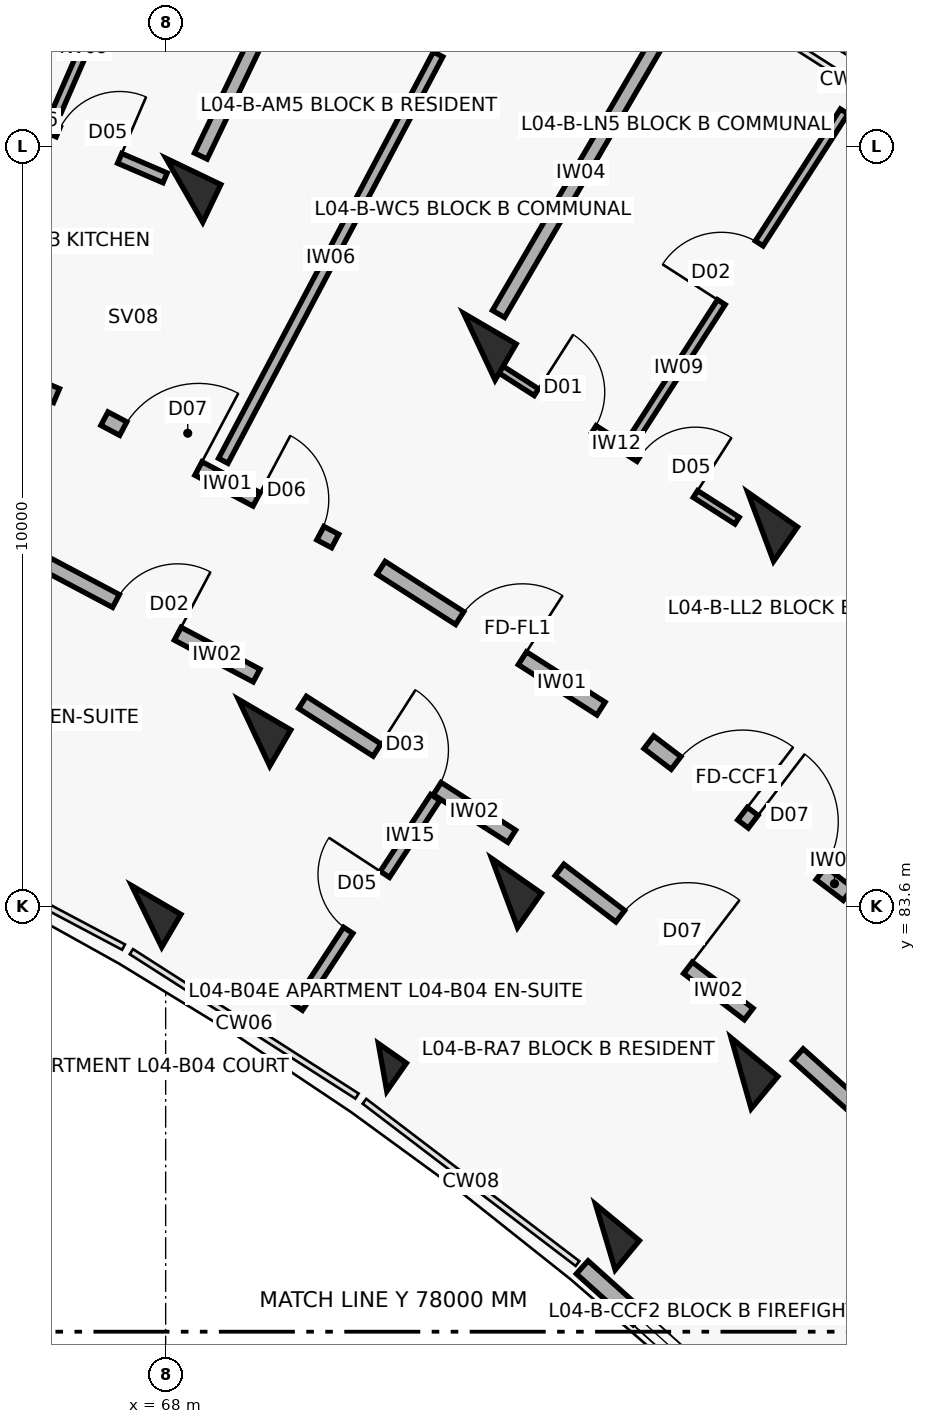
"""IFC4 building model, lengths in metres.
Left out: names, types, materials, properties, quantities, classifications, styles, units other than length and angle.
Written with IfcOpenShell. Run it as: python <this file> out.ifc"""

import sys

from ifc_helpers import new_model, si_unit, direction, frame, frame_2d, origin, origin_2d, place, context, subcontext, project, spatial, rectangle, extrude, element, fill, save


model = new_model("IFC4")
c1 = context("Model", 3, precision=1e-05, world=origin(), true_north=direction((0.0, 1.0)))
c2 = subcontext(c1, "Body", "Model", "MODEL_VIEW")
j1 = project(units=[si_unit("LENGTHUNIT", "METRE"), si_unit("PLANEANGLEUNIT", "RADIAN")], contexts=[c1])
p1 = place(None, origin())
s1 = spatial("IfcSite", under=j1, at=p1, CompositionType="ELEMENT")
p2 = place(p1, origin())
s2 = spatial("IfcBuilding", under=s1, at=p2, CompositionType="ELEMENT")
p3 = place(p2, frame((0.0, 0.0, 14.3)))
s3 = spatial("IfcBuildingStorey", under=s2, at=p3, CompositionType="ELEMENT", Elevation=14.3)
p4 = place(p3, frame((68.246, 93.019, 0.0), z_axis=(0.0, 0.0, 1.0), x_axis=(0.432085748802, 0.901832526405, 0.0)))
e1 = element("IfcColumn", 1, at=p4, inside=s3, PredefinedType="COLUMN", context=c2, shape_type="SweptSolid", body=[
    extrude(rectangle(XDim=0.55, YDim=0.8, at=origin_2d()), origin(), (0.0, 0.0, 1.0), 3.1),
])
p5 = place(p3, frame((67.751, 83.464, 0.0), z_axis=(0.0, 0.0, 1.0), x_axis=(0.504226211181, 0.863571611366, 0.0)))
e2 = element("IfcColumn", 2, at=p5, inside=s3, PredefinedType="COLUMN", context=c2, shape_type="SweptSolid", body=[
    extrude(rectangle(XDim=0.5, YDim=0.75, at=origin_2d()), origin(), (0.0, 0.0, 1.0), 3.1),
])
for number, where, z_axis, x_axis in (
    (3, (69.163, 85.882, 0.0), (0.0, 0.0, 1.0), (0.504, 0.864, 0.0)),
    (4, (72.127, 90.96, 0.0), (0.0, 0.0, 1.0), (0.504, 0.864, 0.0)),
):
    element("IfcColumn", number, at=place(p3, frame(where, z_axis=z_axis, x_axis=x_axis)), inside=s3, PredefinedType="COLUMN", context=c2, shape_type="SweptSolid", body=[
        extrude(rectangle(XDim=0.55, YDim=0.8, at=origin_2d()), origin(), (0.0, 0.0, 1.0), 3.1),
    ])
p6 = place(p3, frame((70.854, 81.478, 0.0), z_axis=(0.0, 0.0, 1.0), x_axis=(0.573004420611, 0.819552276527, 0.0)))
e5 = element("IfcColumn", 5, at=p6, inside=s3, PredefinedType="COLUMN", context=c2, shape_type="SweptSolid", body=[
    extrude(rectangle(XDim=0.45, YDim=0.45, at=origin_2d()), origin(), (0.0, 0.0, 1.0), 3.1),
])
for number, where, z_axis, x_axis in (
    (6, (72.458, 83.773, 0.0), (0.0, 0.0, 1.0), (0.573, 0.82, 0.0)),
    (7, (75.828, 88.592, 0.0), (0.0, 0.0, 1.0), (0.573, 0.82, 0.0)),
):
    element("IfcColumn", number, at=place(p3, frame(where, z_axis=z_axis, x_axis=x_axis)), inside=s3, PredefinedType="COLUMN", context=c2, shape_type="SweptSolid", body=[
        extrude(rectangle(XDim=0.55, YDim=0.8, at=origin_2d()), origin(), (0.0, 0.0, 1.0), 3.1),
    ])
p7 = place(p3, frame((73.785, 79.245, 0.0), z_axis=(0.0, 0.0, 1.0), x_axis=(0.637961754089, 0.770068049148, 0.0)))
e8 = element("IfcColumn", 8, at=p7, inside=s3, PredefinedType="COLUMN", context=c2, shape_type="SweptSolid", body=[
    extrude(rectangle(XDim=0.5, YDim=0.75, at=origin_2d()), origin(), (0.0, 0.0, 1.0), 3.1),
])
p8 = place(p3, frame((75.571, 81.402, 0.0), z_axis=(0.0, 0.0, 1.0), x_axis=(0.637961754089, 0.770068049148, 0.0)))
e9 = element("IfcColumn", 9, at=p8, inside=s3, PredefinedType="COLUMN", context=c2, shape_type="SweptSolid", body=[
    extrude(rectangle(XDim=0.55, YDim=0.8, at=origin_2d()), origin(), (0.0, 0.0, 1.0), 3.1),
])
p9 = place(p3, frame((73.481, 78.847, 0.0), z_axis=(0.0, 0.0, 1.0), x_axis=(0.743385092197, -0.668863666751, 0.0)))
e10 = element("IfcWall", 10, at=p9, inside=s3, PredefinedType="SOLIDWALL", context=c2, shape_type="SweptSolid", body=[
    extrude(rectangle(XDim=3.604, YDim=0.23, at=frame_2d((1.802, 0.0))), origin(), (0.0, 0.0, 1.0), 2.25),
])
p10 = place(p9, frame((1.002, 0.0, 0.32)))
e11 = element("IfcOpeningElement", 11, at=p10, cuts=e10, PredefinedType="OPENING", context=c2, shape_type="SweptSolid", body=[
    extrude(rectangle(XDim=1.6, YDim=1.5, at=frame_2d((0.8, 0.75))), frame((0.0, 0.125, 0.0), z_axis=(0.0, -1.0, 0.0), x_axis=(1.0, 0.0, 0.0)), (0.0, 0.0, 1.0), 0.25),
])
p11 = place(p3, frame((63.407, 91.673, 0.0), z_axis=(0.0, 0.0, 1.0), x_axis=(0.918718172399, -0.394913813008, 0.0)))
e12 = element("IfcWall", 12, at=p11, inside=s3, PredefinedType="SOLIDWALL", context=c2, shape_type="SweptSolid", body=[
    extrude(rectangle(XDim=3.436, YDim=0.2, at=frame_2d((1.718, 0.0))), origin(), (0.0, 0.0, 1.0), 2.08),
])
p12 = place(p11, frame((1.228, 0.0, 0.0)))
e13 = element("IfcOpeningElement", 13, at=p12, cuts=e12, PredefinedType="OPENING", context=c2, shape_type="SweptSolid", body=[
    extrude(rectangle(XDim=0.98, YDim=2.15, at=frame_2d((0.49, 1.075))), frame((0.0, 0.11, 0.0), z_axis=(0.0, -1.0, 0.0), x_axis=(1.0, 0.0, 0.0)), (0.0, 0.0, 1.0), 0.22),
])
p13 = place(p3, frame((64.503, 94.682, 0.0), z_axis=(0.0, 0.0, 1.0), x_axis=(0.918732171064, -0.394881245253, 0.0)))
e14 = element("IfcWall", 14, at=p13, inside=s3, PredefinedType="PARTITIONING", context=c2, shape_type="SweptSolid", body=[
    extrude(rectangle(XDim=3.797, YDim=0.14, at=frame_2d((1.899, 0.0))), origin(), (0.0, 0.0, 1.0), 2.08),
])
p14 = place(p13, frame((0.65, 0.0, 0.0)))
e15 = element("IfcOpeningElement", 15, at=p14, cuts=e14, PredefinedType="OPENING", context=c2, shape_type="SweptSolid", body=[
    extrude(rectangle(XDim=0.9, YDim=2.1, at=frame_2d((0.45, 1.05))), frame((0.0, 0.08, 0.0), z_axis=(0.0, -1.0, 0.0), x_axis=(1.0, 0.0, 0.0)), (0.0, 0.0, 1.0), 0.16),
])
p15 = place(p13, frame((2.267, 0.0, 0.0)))
e16 = element("IfcOpeningElement", 16, at=p15, cuts=e14, PredefinedType="OPENING", context=c2, shape_type="SweptSolid", body=[
    extrude(rectangle(XDim=0.88, YDim=2.1, at=frame_2d((0.44, 1.05))), frame((0.0, 0.08, 0.0), z_axis=(0.0, -1.0, 0.0), x_axis=(1.0, 0.0, 0.0)), (0.0, 0.0, 1.0), 0.16),
])
p16 = place(p3, frame((66.569, 94.06, 0.0), z_axis=(0.0, 0.0, 1.0), x_axis=(0.399048563147, 0.916929792433, 0.0)))
e17 = element("IfcWall", 17, at=p16, inside=s3, PredefinedType="PARTITIONING", context=c2, shape_type="SweptSolid", body=[
    extrude(rectangle(XDim=4.9, YDim=0.12, at=frame_2d((2.45, 0.0))), origin(), (0.0, 0.0, 1.0), 2.08),
])
p17 = place(p16, frame((1.8, 0.0, 0.0)))
e18 = element("IfcOpeningElement", 18, at=p17, cuts=e17, PredefinedType="OPENING", context=c2, shape_type="SweptSolid", body=[
    extrude(rectangle(XDim=1.3, YDim=2.1, at=frame_2d((0.65, 1.05))), frame((0.0, 0.07, 0.0), z_axis=(0.0, -1.0, 0.0), x_axis=(1.0, 0.0, 0.0)), (0.0, 0.0, 1.0), 0.14),
])
p18 = place(p3, frame((67.194, 90.014, 0.0), z_axis=(0.0, 0.0, 1.0), x_axis=(0.883410853063, -0.468599258099, 0.0)))
e19 = element("IfcWall", 19, at=p18, inside=s3, PredefinedType="SOLIDWALL", context=c2, shape_type="SweptSolid", body=[
    extrude(rectangle(XDim=3.436, YDim=0.2, at=frame_2d((1.718, 0.0))), origin(), (0.0, 0.0, 1.0), 2.08),
])
p19 = place(p18, frame((0.28, 0.0, 0.0)))
e20 = element("IfcOpeningElement", 20, at=p19, cuts=e19, PredefinedType="OPENING", context=c2, shape_type="SweptSolid", body=[
    extrude(rectangle(XDim=1.12, YDim=2.15, at=frame_2d((0.56, 1.075))), frame((0.0, 0.11, 0.0), z_axis=(0.0, -1.0, 0.0), x_axis=(1.0, 0.0, 0.0)), (0.0, 0.0, 1.0), 0.22),
])
p20 = place(p18, frame((2.266, 0.0, 0.0)))
e21 = element("IfcOpeningElement", 21, at=p20, cuts=e19, PredefinedType="OPENING", context=c2, shape_type="SweptSolid", body=[
    extrude(rectangle(XDim=0.95, YDim=2.1, at=frame_2d((0.475, 1.05))), frame((0.0, 0.11, 0.0), z_axis=(0.0, -1.0, 0.0), x_axis=(1.0, 0.0, 0.0)), (0.0, 0.0, 1.0), 0.22),
])
p21 = place(p3, frame((66.309, 88.165, 0.0), z_axis=(0.0, 0.0, 1.0), x_axis=(0.883444301944, -0.468536194293, 0.0)))
e22 = element("IfcWall", 22, at=p21, inside=s3, PredefinedType="SOLIDWALL", context=c2, shape_type="SweptSolid", body=[
    extrude(rectangle(XDim=3.269, YDim=0.19, at=frame_2d((1.634, 0.0))), origin(), (0.0, 0.0, 1.0), 2.08),
])
p22 = place(p21, frame((1.174, 0.0, 0.0)))
e23 = element("IfcOpeningElement", 23, at=p22, cuts=e22, PredefinedType="OPENING", context=c2, shape_type="SweptSolid", body=[
    extrude(rectangle(XDim=0.92, YDim=2.1, at=frame_2d((0.46, 1.05))), frame((0.0, 0.105, 0.0), z_axis=(0.0, -1.0, 0.0), x_axis=(1.0, 0.0, 0.0)), (0.0, 0.0, 1.0), 0.21),
])
p23 = place(p3, frame((68.758, 89.459, 0.0), z_axis=(0.0, 0.0, 1.0), x_axis=(0.467208910392, 0.884146952746, 0.0)))
e24 = element("IfcWall", 24, at=p23, inside=s3, PredefinedType="PARTITIONING", context=c2, shape_type="SweptSolid", body=[
    extrude(rectangle(XDim=7.95, YDim=0.14, at=frame_2d((3.975, 0.0))), origin(), (0.0, 0.0, 1.0), 2.08),
])
p24 = place(p23, frame((6.05, 0.0, 0.0)))
e25 = element("IfcOpeningElement", 25, at=p24, cuts=e24, PredefinedType="OPENING", context=c2, shape_type="SweptSolid", body=[
    extrude(rectangle(XDim=0.92, YDim=2.1, at=frame_2d((0.46, 1.05))), frame((0.0, 0.08, 0.0), z_axis=(0.0, -1.0, 0.0), x_axis=(1.0, 0.0, 0.0)), (0.0, 0.0, 1.0), 0.16),
])
p25 = place(p3, frame((68.462, 93.469, 0.0), z_axis=(0.0, 0.0, 1.0), x_axis=(0.432086898897, 0.901831975371, 0.0)))
e26 = element("IfcWall", 26, at=p25, inside=s3, PredefinedType="SOLIDWALL", context=c2, shape_type="SweptSolid", body=[
    extrude(rectangle(XDim=4.35, YDim=0.185, at=frame_2d((2.175, 0.0))), origin(), (0.0, 0.0, 1.0), 2.08),
])
p26 = place(p3, frame((70.834, 88.051, 0.0), z_axis=(0.0, 0.0, 1.0), x_axis=(0.842257205985, -0.539075874963, 0.0)))
e27 = element("IfcWall", 27, at=p26, inside=s3, PredefinedType="SOLIDWALL", context=c2, shape_type="SweptSolid", body=[
    extrude(rectangle(XDim=3.436, YDim=0.2, at=frame_2d((1.718, 0.0))), origin(), (0.0, 0.0, 1.0), 2.08),
])
p27 = place(p26, frame((1.228, 0.0, 0.0)))
e28 = element("IfcOpeningElement", 28, at=p27, cuts=e27, PredefinedType="OPENING", context=c2, shape_type="SweptSolid", body=[
    extrude(rectangle(XDim=0.98, YDim=2.15, at=frame_2d((0.49, 1.075))), frame((0.0, 0.11, 0.0), z_axis=(0.0, -1.0, 0.0), x_axis=(1.0, 0.0, 0.0)), (0.0, 0.0, 1.0), 0.22),
])
p28 = place(p3, frame((69.8, 86.281, 0.0), z_axis=(0.0, 0.0, 1.0), x_axis=(0.842225276846, -0.539125758095, 0.0)))
e29 = element("IfcWall", 29, at=p28, inside=s3, PredefinedType="SOLIDWALL", context=c2, shape_type="SweptSolid", body=[
    extrude(rectangle(XDim=3.269, YDim=0.19, at=frame_2d((1.634, 0.0))), origin(), (0.0, 0.0, 1.0), 2.08),
])
p29 = place(p28, frame((1.164, 0.0, 0.0)))
e30 = element("IfcOpeningElement", 30, at=p29, cuts=e29, PredefinedType="OPENING", context=c2, shape_type="SweptSolid", body=[
    extrude(rectangle(XDim=0.94, YDim=2.1, at=frame_2d((0.47, 1.05))), frame((0.0, 0.105, 0.0), z_axis=(0.0, -1.0, 0.0), x_axis=(1.0, 0.0, 0.0)), (0.0, 0.0, 1.0), 0.21),
])
p30 = place(p3, frame((69.739, 82.269, 0.0), z_axis=(0.0, 0.0, 1.0), x_axis=(0.547920940513, 0.836530120765, 0.0)))
e31 = element("IfcWall", 31, at=p30, inside=s3, PredefinedType="PARTITIONING", context=c2, shape_type="SweptSolid", body=[
    extrude(rectangle(XDim=3.3, YDim=0.145, at=frame_2d((1.65, 0.0))), origin(), (0.0, 0.0, 1.0), 2.08),
])
p31 = place(p30, frame((1.21, 0.0, 0.0)))
e32 = element("IfcOpeningElement", 32, at=p31, cuts=e31, PredefinedType="OPENING", context=c2, shape_type="SweptSolid", body=[
    extrude(rectangle(XDim=0.88, YDim=2.1, at=frame_2d((0.44, 1.05))), frame((0.0, 0.083, 0.0), z_axis=(0.0, -1.0, 0.0), x_axis=(1.0, 0.0, 0.0)), (0.0, 0.0, 1.0), 0.165),
])
p32 = place(p3, frame((72.33, 90.712, 0.0), z_axis=(0.0, 0.0, 1.0), x_axis=(0.842245628842, -0.539093962771, 0.0)))
e33 = element("IfcWall", 33, at=p32, inside=s3, PredefinedType="PARTITIONING", context=c2, shape_type="SweptSolid", body=[
    extrude(rectangle(XDim=3.785, YDim=0.105, at=frame_2d((1.893, 0.0))), origin(), (0.0, 0.0, 1.0), 2.08),
])
p33 = place(p32, frame((0.65, 0.0, 0.0)))
e34 = element("IfcOpeningElement", 34, at=p33, cuts=e33, PredefinedType="OPENING", context=c2, shape_type="SweptSolid", body=[
    extrude(rectangle(XDim=0.9, YDim=2.1, at=frame_2d((0.45, 1.05))), frame((0.0, 0.062, 0.0), z_axis=(0.0, -1.0, 0.0), x_axis=(1.0, 0.0, 0.0)), (0.0, 0.0, 1.0), 0.125),
])
p34 = place(p32, frame((2.255, 0.0, 0.0)))
e35 = element("IfcOpeningElement", 35, at=p34, cuts=e33, PredefinedType="OPENING", context=c2, shape_type="SweptSolid", body=[
    extrude(rectangle(XDim=0.88, YDim=2.1, at=frame_2d((0.44, 1.05))), frame((0.0, 0.062, 0.0), z_axis=(0.0, -1.0, 0.0), x_axis=(1.0, 0.0, 0.0)), (0.0, 0.0, 1.0), 0.125),
])
p35 = place(p3, frame((74.192, 89.81, 0.0), z_axis=(0.0, 0.0, 1.0), x_axis=(0.541612517702, 0.840628265447, 0.0)))
e36 = element("IfcWall", 36, at=p35, inside=s3, PredefinedType="PARTITIONING", context=c2, shape_type="SweptSolid", body=[
    extrude(rectangle(XDim=5.05, YDim=0.12, at=frame_2d((2.525, 0.0))), origin(), (0.0, 0.0, 1.0), 2.08),
])
p36 = place(p35, frame((2.065, 0.0, 0.0)))
e37 = element("IfcOpeningElement", 37, at=p36, cuts=e36, PredefinedType="OPENING", context=c2, shape_type="SweptSolid", body=[
    extrude(rectangle(XDim=0.92, YDim=2.1, at=frame_2d((0.46, 1.05))), frame((0.0, 0.07, 0.0), z_axis=(0.0, -1.0, 0.0), x_axis=(1.0, 0.0, 0.0)), (0.0, 0.0, 1.0), 0.14),
])
p37 = place(p3, frame((72.379, 91.392, 0.0), z_axis=(0.0, 0.0, 1.0), x_axis=(0.504216452091, 0.863577309475, 0.0)))
e38 = element("IfcWall", 38, at=p37, inside=s3, PredefinedType="SOLIDWALL", context=c2, shape_type="SweptSolid", body=[
    extrude(rectangle(XDim=4.35, YDim=0.185, at=frame_2d((2.175, 0.0))), origin(), (0.0, 0.0, 1.0), 2.08),
])
p38 = place(p3, frame((74.357, 85.756, 0.0), z_axis=(0.0, 0.0, 1.0), x_axis=(0.795498026433, -0.605956178235, 0.0)))
e39 = element("IfcWall", 39, at=p38, inside=s3, PredefinedType="SOLIDWALL", context=c2, shape_type="SweptSolid", body=[
    extrude(rectangle(XDim=3.296, YDim=0.21, at=frame_2d((1.648, 0.0))), origin(), (0.0, 0.0, 1.0), 2.08),
])
p39 = place(p38, frame((0.45, 0.0, 0.0)))
e40 = element("IfcOpeningElement", 40, at=p39, cuts=e39, PredefinedType="OPENING", context=c2, shape_type="SweptSolid", body=[
    extrude(rectangle(XDim=1.1, YDim=2.15, at=frame_2d((0.55, 1.075))), frame((0.0, 0.115, 0.0), z_axis=(0.0, -1.0, 0.0), x_axis=(1.0, 0.0, 0.0)), (0.0, 0.0, 1.0), 0.23),
])
p40 = place(p38, frame((1.726, 0.0, 0.0)))
e41 = element("IfcOpeningElement", 41, at=p40, cuts=e39, PredefinedType="OPENING", context=c2, shape_type="SweptSolid", body=[
    extrude(rectangle(XDim=1.12, YDim=2.15, at=frame_2d((0.56, 1.075))), frame((0.0, 0.115, 0.0), z_axis=(0.0, -1.0, 0.0), x_axis=(1.0, 0.0, 0.0)), (0.0, 0.0, 1.0), 0.23),
])
p41 = place(p3, frame((73.182, 84.076, 0.0), z_axis=(0.0, 0.0, 1.0), x_axis=(0.795501577908, -0.605951515838, 0.0)))
e42 = element("IfcWall", 42, at=p41, inside=s3, PredefinedType="SOLIDWALL", context=c2, shape_type="SweptSolid", body=[
    extrude(rectangle(XDim=3.129, YDim=0.19, at=frame_2d((1.564, 0.0))), origin(), (0.0, 0.0, 1.0), 2.08),
])
p42 = place(p41, frame((1.004, 0.0, 0.0)))
e43 = element("IfcOpeningElement", 43, at=p42, cuts=e42, PredefinedType="OPENING", context=c2, shape_type="SweptSolid", body=[
    extrude(rectangle(XDim=1.12, YDim=2.15, at=frame_2d((0.56, 1.075))), frame((0.0, 0.105, 0.0), z_axis=(0.0, -1.0, 0.0), x_axis=(1.0, 0.0, 0.0)), (0.0, 0.0, 1.0), 0.21),
])
p43 = place(p3, frame((76.317, 81.644, 0.0), z_axis=(0.0, 0.0, 1.0), x_axis=(0.743387266925, -0.668861249718, 0.0)))
e44 = element("IfcWall", 44, at=p43, inside=s3, PredefinedType="SOLIDWALL", context=c2, shape_type="SweptSolid", body=[
    extrude(rectangle(XDim=3.128, YDim=0.21, at=frame_2d((1.564, 0.0))), origin(), (0.0, 0.0, 1.0), 2.08),
])
p44 = place(p43, frame((1.014, 0.0, 0.0)))
e45 = element("IfcOpeningElement", 45, at=p44, cuts=e44, PredefinedType="OPENING", context=c2, shape_type="SweptSolid", body=[
    extrude(rectangle(XDim=1.1, YDim=2.15, at=frame_2d((0.55, 1.075))), frame((0.0, 0.115, 0.0), z_axis=(0.0, -1.0, 0.0), x_axis=(1.0, 0.0, 0.0)), (0.0, 0.0, 1.0), 0.23),
])
p45 = place(p10, origin())
e46 = element("IfcWindow", 46, at=p45, inside=s3, PartitioningType="DOUBLE_PANEL_VERTICAL", PredefinedType="WINDOW", context=c2, shape_type="SweptSolid", body=[
    extrude(rectangle(XDim=1.6, YDim=1.5, at=frame_2d((0.8, 0.75))), frame((0.0, 0.03, 0.0), z_axis=(0.0, -1.0, 0.0), x_axis=(1.0, 0.0, 0.0)), (0.0, 0.0, 1.0), 0.06),
])
fill(e11, e46)
p46 = place(p15, origin())
e47 = element("IfcDoor", 47, at=p46, inside=s3, OperationType="SINGLE_SWING_RIGHT", PredefinedType="DOOR", context=c2, shape_type="SweptSolid", body=[
    extrude(rectangle(XDim=0.88, YDim=2.1, at=frame_2d((0.44, 1.05))), frame((0.0, 0.025, 0.0), z_axis=(0.0, -1.0, 0.0), x_axis=(1.0, 0.0, 0.0)), (0.0, 0.0, 1.0), 0.05),
])
fill(e16, e47)
p47 = place(p19, origin())
e48 = element("IfcDoor", 48, at=p47, inside=s3, OperationType="SINGLE_SWING_RIGHT", PredefinedType="DOOR", context=c2, shape_type="SweptSolid", body=[
    extrude(rectangle(XDim=1.12, YDim=2.15, at=frame_2d((0.56, 1.075))), frame((0.0, 0.025, 0.0), z_axis=(0.0, -1.0, 0.0), x_axis=(1.0, 0.0, 0.0)), (0.0, 0.0, 1.0), 0.05),
])
fill(e20, e48)
p48 = place(p20, origin())
e49 = element("IfcDoor", 49, at=p48, inside=s3, OperationType="SINGLE_SWING_LEFT", PredefinedType="DOOR", context=c2, shape_type="SweptSolid", body=[
    extrude(rectangle(XDim=0.95, YDim=2.1, at=frame_2d((0.475, 1.05))), frame((0.0, 0.025, 0.0), z_axis=(0.0, -1.0, 0.0), x_axis=(1.0, 0.0, 0.0)), (0.0, 0.0, 1.0), 0.05),
])
fill(e21, e49)
p49 = place(p22, origin())
e50 = element("IfcDoor", 50, at=p49, inside=s3, OperationType="SINGLE_SWING_RIGHT", PredefinedType="DOOR", context=c2, shape_type="SweptSolid", body=[
    extrude(rectangle(XDim=0.92, YDim=2.1, at=frame_2d((0.46, 1.05))), frame((0.0, 0.025, 0.0), z_axis=(0.0, -1.0, 0.0), x_axis=(1.0, 0.0, 0.0)), (0.0, 0.0, 1.0), 0.05),
])
fill(e23, e50)
p50 = place(p24, origin())
e51 = element("IfcDoor", 51, at=p50, inside=s3, OperationType="SINGLE_SWING_LEFT", PredefinedType="DOOR", context=c2, shape_type="SweptSolid", body=[
    extrude(rectangle(XDim=0.92, YDim=2.1, at=frame_2d((0.46, 1.05))), frame((0.0, 0.025, 0.0), z_axis=(0.0, -1.0, 0.0), x_axis=(1.0, 0.0, 0.0)), (0.0, 0.0, 1.0), 0.05),
])
fill(e25, e51)
p51 = place(p27, origin())
e52 = element("IfcDoor", 52, at=p51, inside=s3, OperationType="SINGLE_SWING_RIGHT", PredefinedType="DOOR", context=c2, shape_type="SweptSolid", body=[
    extrude(rectangle(XDim=0.98, YDim=2.15, at=frame_2d((0.49, 1.075))), frame((0.0, 0.025, 0.0), z_axis=(0.0, -1.0, 0.0), x_axis=(1.0, 0.0, 0.0)), (0.0, 0.0, 1.0), 0.05),
])
fill(e28, e52)
p52 = place(p29, origin())
e53 = element("IfcDoor", 53, at=p52, inside=s3, OperationType="SINGLE_SWING_LEFT", PredefinedType="DOOR", context=c2, shape_type="SweptSolid", body=[
    extrude(rectangle(XDim=0.94, YDim=2.1, at=frame_2d((0.47, 1.05))), frame((0.0, 0.025, 0.0), z_axis=(0.0, -1.0, 0.0), x_axis=(1.0, 0.0, 0.0)), (0.0, 0.0, 1.0), 0.05),
])
fill(e30, e53)
p53 = place(p31, origin())
e54 = element("IfcDoor", 54, at=p53, inside=s3, OperationType="SINGLE_SWING_RIGHT", PredefinedType="DOOR", context=c2, shape_type="SweptSolid", body=[
    extrude(rectangle(XDim=0.88, YDim=2.1, at=frame_2d((0.44, 1.05))), frame((0.0, 0.025, 0.0), z_axis=(0.0, -1.0, 0.0), x_axis=(1.0, 0.0, 0.0)), (0.0, 0.0, 1.0), 0.05),
])
fill(e32, e54)
p54 = place(p33, origin())
e55 = element("IfcDoor", 55, at=p54, inside=s3, OperationType="SINGLE_SWING_LEFT", PredefinedType="DOOR", context=c2, shape_type="SweptSolid", body=[
    extrude(rectangle(XDim=0.9, YDim=2.1, at=frame_2d((0.45, 1.05))), frame((0.0, 0.025, 0.0), z_axis=(0.0, -1.0, 0.0), x_axis=(1.0, 0.0, 0.0)), (0.0, 0.0, 1.0), 0.05),
])
fill(e34, e55)
p55 = place(p34, origin())
e56 = element("IfcDoor", 56, at=p55, inside=s3, OperationType="SINGLE_SWING_RIGHT", PredefinedType="DOOR", context=c2, shape_type="SweptSolid", body=[
    extrude(rectangle(XDim=0.88, YDim=2.1, at=frame_2d((0.44, 1.05))), frame((0.0, 0.025, 0.0), z_axis=(0.0, -1.0, 0.0), x_axis=(1.0, 0.0, 0.0)), (0.0, 0.0, 1.0), 0.05),
])
fill(e35, e56)
p56 = place(p36, origin())
e57 = element("IfcDoor", 57, at=p56, inside=s3, OperationType="SINGLE_SWING_LEFT", PredefinedType="DOOR", context=c2, shape_type="SweptSolid", body=[
    extrude(rectangle(XDim=0.92, YDim=2.1, at=frame_2d((0.46, 1.05))), frame((0.0, 0.025, 0.0), z_axis=(0.0, -1.0, 0.0), x_axis=(1.0, 0.0, 0.0)), (0.0, 0.0, 1.0), 0.05),
])
fill(e37, e57)
p57 = place(p39, origin())
e58 = element("IfcDoor", 58, at=p57, inside=s3, OperationType="SINGLE_SWING_RIGHT", PredefinedType="DOOR", context=c2, shape_type="SweptSolid", body=[
    extrude(rectangle(XDim=1.1, YDim=2.15, at=frame_2d((0.55, 1.075))), frame((0.0, 0.025, 0.0), z_axis=(0.0, -1.0, 0.0), x_axis=(1.0, 0.0, 0.0)), (0.0, 0.0, 1.0), 0.05),
])
fill(e40, e58)
p58 = place(p40, origin())
e59 = element("IfcDoor", 59, at=p58, inside=s3, OperationType="SINGLE_SWING_LEFT", PredefinedType="DOOR", context=c2, shape_type="SweptSolid", body=[
    extrude(rectangle(XDim=1.12, YDim=2.15, at=frame_2d((0.56, 1.075))), frame((0.0, 0.025, 0.0), z_axis=(0.0, -1.0, 0.0), x_axis=(1.0, 0.0, 0.0)), (0.0, 0.0, 1.0), 0.05),
])
fill(e41, e59)
p59 = place(p42, origin())
e60 = element("IfcDoor", 60, at=p59, inside=s3, OperationType="SINGLE_SWING_RIGHT", PredefinedType="DOOR", context=c2, shape_type="SweptSolid", body=[
    extrude(rectangle(XDim=1.12, YDim=2.15, at=frame_2d((0.56, 1.075))), frame((0.0, 0.025, 0.0), z_axis=(0.0, -1.0, 0.0), x_axis=(1.0, 0.0, 0.0)), (0.0, 0.0, 1.0), 0.05),
])
fill(e43, e60)
save(model, sys.argv[1])
